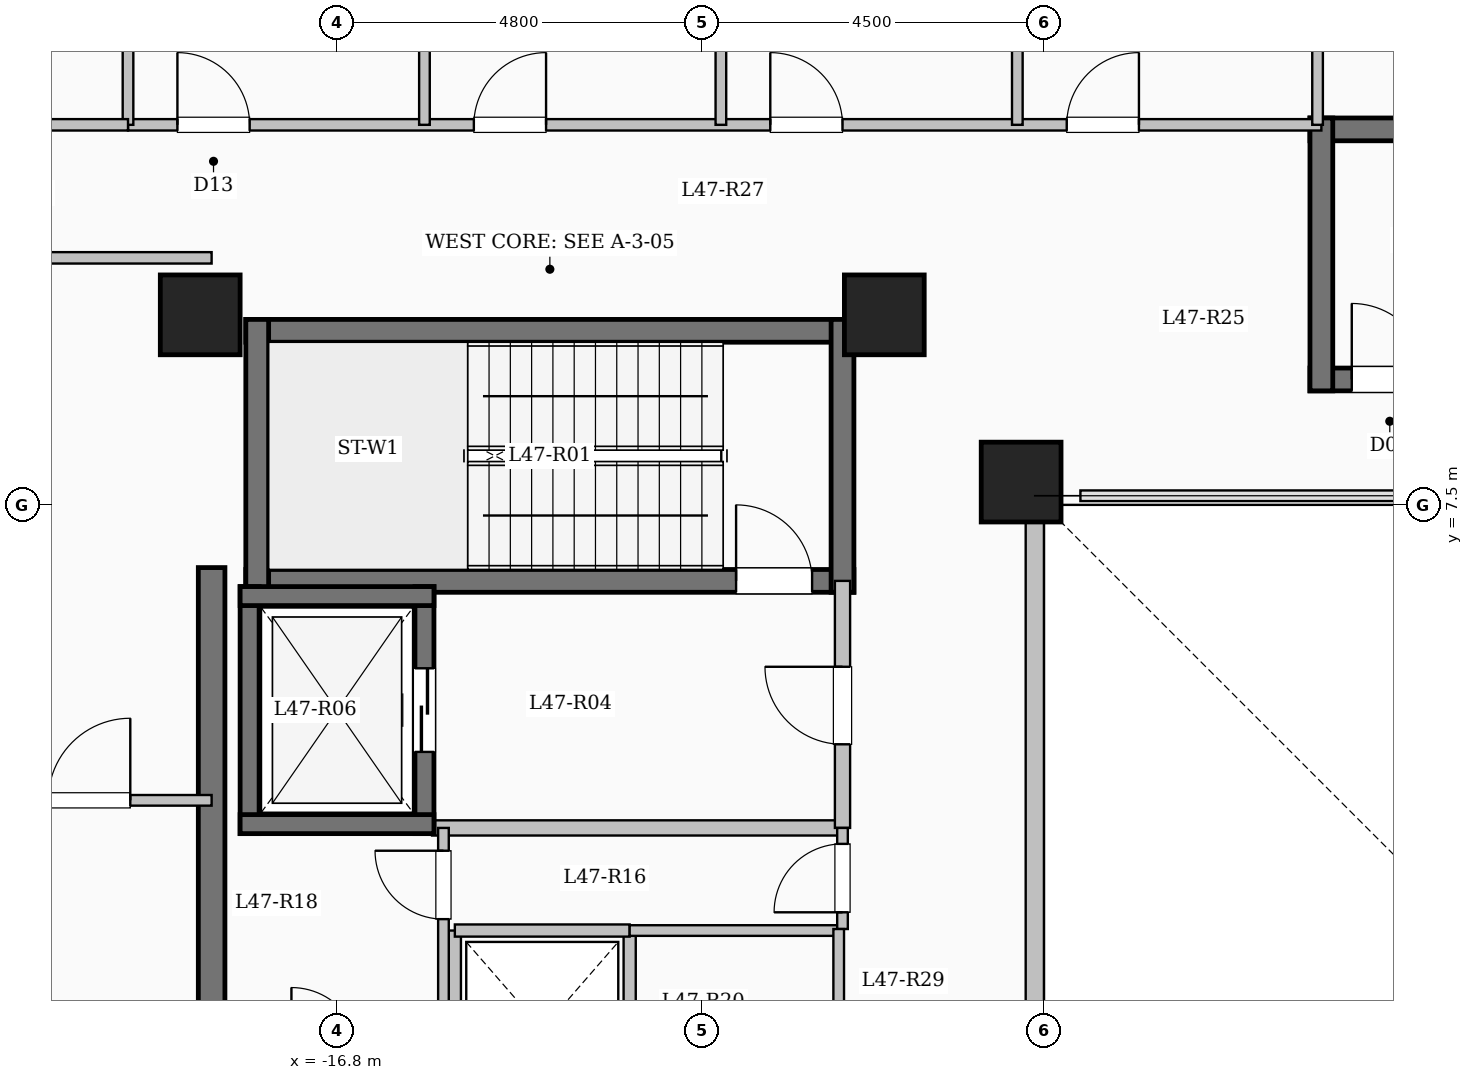
"""IFC4 building model, lengths in metres.
Left out: names, types, materials, properties, quantities, classifications, styles, units other than length and angle.
Written with IfcOpenShell. Run it as: python <this file> out.ifc"""

import sys

from ifc_helpers import new_model, si_unit, direction, frame, frame_2d, origin, origin_2d, place, context, subcontext, project, spatial, rectangle, extrude, element, fill, save


model = new_model("IFC4")
c1 = context("Model", 3, precision=1e-05, world=origin(), true_north=direction((0.0, 1.0)))
c2 = subcontext(c1, "Body", "Model", "MODEL_VIEW")
j1 = project(units=[si_unit("LENGTHUNIT", "METRE"), si_unit("PLANEANGLEUNIT", "RADIAN")], contexts=[c1])
p1 = place(None, origin())
s1 = spatial("IfcSite", under=j1, at=p1, CompositionType="ELEMENT")
p2 = place(p1, origin())
s2 = spatial("IfcBuilding", under=s1, at=p2, CompositionType="ELEMENT")
p3 = place(p2, frame((0.0, 0.0, 172.8)))
s3 = spatial("IfcBuildingStorey", under=s2, at=p3, CompositionType="ELEMENT", Elevation=172.8)
for number, where, z_axis, x_axis in (
    (1, (-7.8, 7.8, 0.0), (0.0, 0.0, 1.0), (1.0, 0.0, 0.0)),
    (2, (-9.6, 10.0, 0.0), (0.0, 0.0, 1.0), (1.0, 0.0, 0.0)),
    (3, (-18.6, 10.0, 0.0), (0.0, 0.0, 1.0), (1.0, 0.0, 0.0)),
):
    element("IfcColumn", number, at=place(p3, frame(where, z_axis=z_axis, x_axis=x_axis)), inside=s3, PredefinedType="COLUMN", context=c2, shape_type="SweptSolid", body=[
        extrude(rectangle(XDim=1.05, YDim=1.05, at=origin_2d()), origin(), (0.0, 0.0, 1.0), 4.5),
    ])
p4 = place(p3, frame((-7.62, 7.62, 0.0), z_axis=(0.0, 0.0, 1.0), x_axis=(0.0, -1.0, 0.0)))
e4 = element("IfcWall", 4, at=p4, inside=s3, PredefinedType="SOLIDWALL", context=c2, shape_type="SweptSolid", body=[
    extrude(rectangle(XDim=15.24, YDim=0.24, at=frame_2d((7.62, 0.0))), origin(), (0.0, 0.0, 1.0), 4.2),
])
p5 = place(p4, frame((6.92, 0.0, 0.95)))
e5 = element("IfcOpeningElement", 5, at=p5, cuts=e4, PredefinedType="OPENING", context=c2, shape_type="SweptSolid", body=[
    extrude(rectangle(XDim=1.4, YDim=1.5, at=frame_2d((0.7, 0.75))), frame((0.0, 0.13, 0.0), z_axis=(0.0, -1.0, 0.0), x_axis=(1.0, 0.0, 0.0)), (0.0, 0.0, 1.0), 0.26),
])
p6 = place(p3, frame((-18.0, 9.79, 0.0), z_axis=(0.0, 0.0, 1.0), x_axis=(1.0, 0.0, 0.0)))
e6 = element("IfcWall", 6, at=p6, inside=s3, PredefinedType="SHEAR", context=c2, shape_type="SweptSolid", body=[
    extrude(rectangle(XDim=8.0, YDim=0.3, at=frame_2d((4.0, 0.0))), origin(), (0.0, 0.0, 1.0), 4.5),
])
p7 = place(p3, frame((-18.0, 6.5, 0.0), z_axis=(0.0, 0.0, 1.0), x_axis=(1.0, 0.0, 0.0)))
e7 = element("IfcWall", 7, at=p7, inside=s3, PredefinedType="SHEAR", context=c2, shape_type="SweptSolid", body=[
    extrude(rectangle(XDim=8.0, YDim=0.3, at=frame_2d((4.0, 0.0))), origin(), (0.0, 0.0, 1.0), 4.5),
])
p8 = place(p7, frame((6.45, 0.0, 0.0)))
e8 = element("IfcOpeningElement", 8, at=p8, cuts=e7, PredefinedType="OPENING", context=c2, shape_type="SweptSolid", body=[
    extrude(rectangle(XDim=1.0, YDim=2.15, at=frame_2d((0.5, 1.075))), frame((0.0, 0.16, 0.0), z_axis=(0.0, -1.0, 0.0), x_axis=(1.0, 0.0, 0.0)), (0.0, 0.0, 1.0), 0.32),
])
for number, where, z_axis, x_axis in (
    (9, (-17.85, 6.35, 0.0), (0.0, 0.0, 1.0), (0.0, 1.0, 0.0)),
    (10, (-10.15, 6.35, 0.0), (0.0, 0.0, 1.0), (0.0, 1.0, 0.0)),
):
    element("IfcWall", number, at=place(p3, frame(where, z_axis=z_axis, x_axis=x_axis)), inside=s3, PredefinedType="SHEAR", context=c2, shape_type="SweptSolid", body=[
        extrude(rectangle(XDim=3.59, YDim=0.3, at=frame_2d((1.795, 0.0))), origin(), (0.0, 0.0, 1.0), 4.5),
    ])
p9 = place(p3, frame((-4.0, 12.44, 0.0), z_axis=(0.0, 0.0, 1.0), x_axis=(1.0, 0.0, 0.0)))
e11 = element("IfcWall", 11, at=p9, inside=s3, PredefinedType="SHEAR", context=c2, shape_type="SweptSolid", body=[
    extrude(rectangle(XDim=8.0, YDim=0.3, at=frame_2d((4.0, 0.0))), origin(), (0.0, 0.0, 1.0), 4.5),
])
p10 = place(p3, frame((-4.0, 9.15, 0.0), z_axis=(0.0, 0.0, 1.0), x_axis=(1.0, 0.0, 0.0)))
e12 = element("IfcWall", 12, at=p10, inside=s3, PredefinedType="SHEAR", context=c2, shape_type="SweptSolid", body=[
    extrude(rectangle(XDim=8.0, YDim=0.3, at=frame_2d((4.0, 0.0))), origin(), (0.0, 0.0, 1.0), 4.5),
])
p11 = place(p10, frame((0.55, 0.0, 0.0)))
e13 = element("IfcOpeningElement", 13, at=p11, cuts=e12, PredefinedType="OPENING", context=c2, shape_type="SweptSolid", body=[
    extrude(rectangle(XDim=1.0, YDim=2.15, at=frame_2d((0.5, 1.075))), frame((0.0, 0.16, 0.0), z_axis=(0.0, -1.0, 0.0), x_axis=(1.0, 0.0, 0.0)), (0.0, 0.0, 1.0), 0.32),
])
p12 = place(p3, frame((-3.85, 9.0, 0.0), z_axis=(0.0, 0.0, 1.0), x_axis=(0.0, 1.0, 0.0)))
e14 = element("IfcWall", 14, at=p12, inside=s3, PredefinedType="SHEAR", context=c2, shape_type="SweptSolid", body=[
    extrude(rectangle(XDim=3.59, YDim=0.3, at=frame_2d((1.795, 0.0))), origin(), (0.0, 0.0, 1.0), 4.5),
])
p13 = place(p3, frame((-15.55, 3.25, 0.0), z_axis=(0.0, 0.0, 1.0), x_axis=(1.0, 0.0, 0.0)))
e15 = element("IfcWall", 15, at=p13, inside=s3, PredefinedType="SOLIDWALL", context=c2, shape_type="SweptSolid", body=[
    extrude(rectangle(XDim=5.4, YDim=0.2, at=frame_2d((2.7, 0.0))), origin(), (0.0, 0.0, 1.0), 4.2),
])
p14 = place(p3, frame((-10.15, 3.25, 0.0), z_axis=(0.0, 0.0, 1.0), x_axis=(0.0, 1.0, 0.0)))
e16 = element("IfcWall", 16, at=p14, inside=s3, PredefinedType="SOLIDWALL", context=c2, shape_type="SweptSolid", body=[
    extrude(rectangle(XDim=3.25, YDim=0.2, at=frame_2d((1.625, 0.0))), origin(), (0.0, 0.0, 1.0), 4.2),
])
p15 = place(p14, frame((1.1, 0.0, 0.0)))
e17 = element("IfcOpeningElement", 17, at=p15, cuts=e16, PredefinedType="OPENING", context=c2, shape_type="SweptSolid", body=[
    extrude(rectangle(XDim=1.02, YDim=2.15, at=frame_2d((0.51, 1.075))), frame((0.0, 0.11, 0.0), z_axis=(0.0, -1.0, 0.0), x_axis=(1.0, 0.0, 0.0)), (0.0, 0.0, 1.0), 0.22),
])
p16 = place(p3, frame((-17.95, 3.175, 0.0), z_axis=(0.0, 0.0, 1.0), x_axis=(0.0, 1.0, 0.0)))
e18 = element("IfcWall", 18, at=p16, inside=s3, PredefinedType="SHEAR", context=c2, shape_type="SweptSolid", body=[
    extrude(rectangle(XDim=3.25, YDim=0.25, at=frame_2d((1.625, 0.0))), origin(), (0.0, 0.0, 1.0), 4.5),
])
p17 = place(p3, frame((-15.65, 3.175, 0.0), z_axis=(0.0, 0.0, 1.0), x_axis=(0.0, 1.0, 0.0)))
e19 = element("IfcWall", 19, at=p17, inside=s3, PredefinedType="SHEAR", context=c2, shape_type="SweptSolid", body=[
    extrude(rectangle(XDim=3.25, YDim=0.25, at=frame_2d((1.625, 0.0))), origin(), (0.0, 0.0, 1.0), 4.5),
])
p18 = place(p17, frame((1.075, 0.0, 0.0)))
e20 = element("IfcOpeningElement", 20, at=p18, cuts=e19, PredefinedType="OPENING", context=c2, shape_type="SweptSolid", body=[
    extrude(rectangle(XDim=1.1, YDim=2.15, at=frame_2d((0.55, 1.075))), frame((0.0, 0.135, 0.0), z_axis=(0.0, -1.0, 0.0), x_axis=(1.0, 0.0, 0.0)), (0.0, 0.0, 1.0), 0.27),
])
for number, where, z_axis, x_axis in (
    (21, (-18.075, 3.3, 0.0), (0.0, 0.0, 1.0), (1.0, 0.0, 0.0)),
    (22, (-18.075, 6.3, 0.0), (0.0, 0.0, 1.0), (1.0, 0.0, 0.0)),
):
    element("IfcWall", number, at=place(p3, frame(where, z_axis=z_axis, x_axis=x_axis)), inside=s3, PredefinedType="SHEAR", context=c2, shape_type="SweptSolid", body=[
        extrude(rectangle(XDim=2.55, YDim=0.25, at=frame_2d((1.275, 0.0))), origin(), (0.0, 0.0, 1.0), 4.5),
    ])
for number, where, z_axis, x_axis in (
    (23, (-15.25, -0.7, 0.0), (0.0, 0.0, 1.0), (0.0, 1.0, 0.0)),
    (24, (-12.95, -0.7, 0.0), (0.0, 0.0, 1.0), (0.0, 1.0, 0.0)),
):
    element("IfcWall", number, at=place(p3, frame(where, z_axis=z_axis, x_axis=x_axis)), inside=s3, PredefinedType="SOLIDWALL", context=c2, shape_type="SweptSolid", body=[
        extrude(rectangle(XDim=2.6, YDim=0.16, at=frame_2d((1.3, 0.0))), origin(), (0.0, 0.0, 1.0), 4.2),
    ])
p19 = place(p3, frame((-15.25, 1.9, 0.0), z_axis=(0.0, 0.0, 1.0), x_axis=(1.0, 0.0, 0.0)))
e25 = element("IfcWall", 25, at=p19, inside=s3, PredefinedType="SOLIDWALL", context=c2, shape_type="SweptSolid", body=[
    extrude(rectangle(XDim=2.3, YDim=0.16, at=frame_2d((1.15, 0.0))), origin(), (0.0, 0.0, 1.0), 4.2),
])
p20 = place(p3, frame((-18.45, -7.375, 0.0), z_axis=(0.0, 0.0, 1.0), x_axis=(0.0, 1.0, 0.0)))
e26 = element("IfcWall", 26, at=p20, inside=s3, PredefinedType="SHEAR", context=c2, shape_type="SweptSolid", body=[
    extrude(rectangle(XDim=14.05, YDim=0.35, at=frame_2d((7.025, 0.0))), origin(), (0.0, 0.0, 1.0), 4.5),
])
p21 = place(p3, frame((-12.95, 1.9, 0.0), z_axis=(0.0, 0.0, 1.0), x_axis=(1.0, 0.0, 0.0)))
e27 = element("IfcWall", 27, at=p21, inside=s3, PredefinedType="PARTITIONING", context=c2, shape_type="SweptSolid", body=[
    extrude(rectangle(XDim=2.8, YDim=0.14, at=frame_2d((1.4, 0.0))), origin(), (0.0, 0.0, 1.0), 4.2),
])
p22 = place(p3, frame((-10.15, 1.92, 0.0), z_axis=(0.0, 0.0, 1.0), x_axis=(0.0, 1.0, 0.0)))
e28 = element("IfcWall", 28, at=p22, inside=s3, PredefinedType="PARTITIONING", context=c2, shape_type="SweptSolid", body=[
    extrude(rectangle(XDim=1.33, YDim=0.14, at=frame_2d((0.665, 0.0))), origin(), (0.0, 0.0, 1.0), 4.2),
])
p23 = place(p22, frame((0.22, 0.0, 0.0)))
e29 = element("IfcOpeningElement", 29, at=p23, cuts=e28, PredefinedType="OPENING", context=c2, shape_type="SweptSolid", body=[
    extrude(rectangle(XDim=0.9, YDim=2.08, at=frame_2d((0.45, 1.04))), frame((0.0, 0.08, 0.0), z_axis=(0.0, -1.0, 0.0), x_axis=(1.0, 0.0, 0.0)), (0.0, 0.0, 1.0), 0.16),
])
p24 = place(p3, frame((-15.4, -7.2, 0.0), z_axis=(0.0, 0.0, 1.0), x_axis=(0.0, 1.0, 0.0)))
e30 = element("IfcWall", 30, at=p24, inside=s3, PredefinedType="PARTITIONING", context=c2, shape_type="SweptSolid", body=[
    extrude(rectangle(XDim=10.45, YDim=0.14, at=frame_2d((5.225, 0.0))), origin(), (0.0, 0.0, 1.0), 4.2),
])
p25 = place(p24, frame((9.25, 0.0, 0.0)))
e31 = element("IfcOpeningElement", 31, at=p25, cuts=e30, PredefinedType="OPENING", context=c2, shape_type="SweptSolid", body=[
    extrude(rectangle(XDim=0.9, YDim=2.08, at=frame_2d((0.45, 1.04))), frame((0.0, 0.08, 0.0), z_axis=(0.0, -1.0, 0.0), x_axis=(1.0, 0.0, 0.0)), (0.0, 0.0, 1.0), 0.16),
])
p26 = place(p3, frame((-10.2, -7.2, 0.0), z_axis=(0.0, 0.0, 1.0), x_axis=(0.0, 1.0, 0.0)))
e32 = element("IfcWall", 32, at=p26, inside=s3, PredefinedType="PARTITIONING", context=c2, shape_type="SweptSolid", body=[
    extrude(rectangle(XDim=9.12, YDim=0.14, at=frame_2d((4.56, 0.0))), origin(), (0.0, 0.0, 1.0), 4.2),
])
p27 = place(p26, frame((1.9, 0.0, 0.0)))
e33 = element("IfcOpeningElement", 33, at=p27, cuts=e32, PredefinedType="OPENING", context=c2, shape_type="SweptSolid", body=[
    extrude(rectangle(XDim=0.95, YDim=2.12, at=frame_2d((0.475, 1.06))), frame((0.0, 0.08, 0.0), z_axis=(0.0, -1.0, 0.0), x_axis=(1.0, 0.0, 0.0)), (0.0, 0.0, 1.0), 0.16),
])
p28 = place(p26, frame((6.6, 0.0, 0.0)))
e34 = element("IfcOpeningElement", 34, at=p28, cuts=e32, PredefinedType="OPENING", context=c2, shape_type="SweptSolid", body=[
    extrude(rectangle(XDim=0.95, YDim=2.12, at=frame_2d((0.475, 1.06))), frame((0.0, 0.08, 0.0), z_axis=(0.0, -1.0, 0.0), x_axis=(1.0, 0.0, 0.0)), (0.0, 0.0, 1.0), 0.16),
])
p29 = place(p3, frame((-19.55, 12.5, 0.0), z_axis=(0.0, 0.0, 1.0), x_axis=(1.0, 0.0, 0.0)))
e35 = element("IfcWall", 35, at=p29, inside=s3, PredefinedType="PARTITIONING", context=c2, shape_type="SweptSolid", body=[
    extrude(rectangle(XDim=15.7, YDim=0.15, at=frame_2d((7.85, 0.0))), origin(), (0.0, 0.0, 1.0), 4.2),
])
p30 = place(p29, frame((0.65, 0.0, 0.0)))
e36 = element("IfcOpeningElement", 36, at=p30, cuts=e35, PredefinedType="OPENING", context=c2, shape_type="SweptSolid", body=[
    extrude(rectangle(XDim=0.95, YDim=2.15, at=frame_2d((0.475, 1.075))), frame((0.0, 0.085, 0.0), z_axis=(0.0, -1.0, 0.0), x_axis=(1.0, 0.0, 0.0)), (0.0, 0.0, 1.0), 0.17),
])
p31 = place(p29, frame((4.55, 0.0, 0.0)))
e37 = element("IfcOpeningElement", 37, at=p31, cuts=e35, PredefinedType="OPENING", context=c2, shape_type="SweptSolid", body=[
    extrude(rectangle(XDim=0.95, YDim=2.15, at=frame_2d((0.475, 1.075))), frame((0.0, 0.085, 0.0), z_axis=(0.0, -1.0, 0.0), x_axis=(1.0, 0.0, 0.0)), (0.0, 0.0, 1.0), 0.17),
])
p32 = place(p29, frame((8.45, 0.0, 0.0)))
e38 = element("IfcOpeningElement", 38, at=p32, cuts=e35, PredefinedType="OPENING", context=c2, shape_type="SweptSolid", body=[
    extrude(rectangle(XDim=0.95, YDim=2.15, at=frame_2d((0.475, 1.075))), frame((0.0, 0.085, 0.0), z_axis=(0.0, -1.0, 0.0), x_axis=(1.0, 0.0, 0.0)), (0.0, 0.0, 1.0), 0.17),
])
p33 = place(p29, frame((12.35, 0.0, 0.0)))
e39 = element("IfcOpeningElement", 39, at=p33, cuts=e35, PredefinedType="OPENING", context=c2, shape_type="SweptSolid", body=[
    extrude(rectangle(XDim=0.95, YDim=2.15, at=frame_2d((0.475, 1.075))), frame((0.0, 0.085, 0.0), z_axis=(0.0, -1.0, 0.0), x_axis=(1.0, 0.0, 0.0)), (0.0, 0.0, 1.0), 0.17),
])
p34 = place(p3, frame((-3.9, 12.5, 0.0), z_axis=(0.0, 0.0, 1.0), x_axis=(0.0, 1.0, 0.0)))
e40 = element("IfcWall", 40, at=p34, inside=s3, PredefinedType="PARTITIONING", context=c2, shape_type="SweptSolid", body=[
    extrude(rectangle(XDim=10.18, YDim=0.14, at=frame_2d((5.09, 0.0))), origin(), (0.0, 0.0, 1.0), 4.2),
])
for number, where, z_axis, x_axis in (
    (41, (-15.65, 12.5, 0.0), (0.0, 0.0, 1.0), (0.0, 1.0, 0.0)),
    (42, (-11.75, 12.5, 0.0), (0.0, 0.0, 1.0), (0.0, 1.0, 0.0)),
):
    element("IfcWall", number, at=place(p3, frame(where, z_axis=z_axis, x_axis=x_axis)), inside=s3, PredefinedType="PARTITIONING", context=c2, shape_type="SweptSolid", body=[
        extrude(rectangle(XDim=8.7, YDim=0.14, at=frame_2d((4.35, 0.0))), origin(), (0.0, 0.0, 1.0), 4.2),
    ])
p35 = place(p3, frame((-7.85, 12.5, 0.0), z_axis=(0.0, 0.0, 1.0), x_axis=(0.0, 1.0, 0.0)))
e43 = element("IfcWall", 43, at=p35, inside=s3, PredefinedType="PARTITIONING", context=c2, shape_type="SweptSolid", body=[
    extrude(rectangle(XDim=9.477, YDim=0.14, at=frame_2d((4.739, 0.0))), origin(), (0.0, 0.0, 1.0), 3.685),
])
p36 = place(p3, frame((-25.08, 10.75, 0.0), z_axis=(0.0, 0.0, 1.0), x_axis=(1.0, 0.0, 0.0)))
e44 = element("IfcWall", 44, at=p36, inside=s3, PredefinedType="PARTITIONING", context=c2, shape_type="SweptSolid", body=[
    extrude(rectangle(XDim=6.63, YDim=0.15, at=frame_2d((3.315, 0.0))), origin(), (0.0, 0.0, 1.0), 4.2),
])
p37 = place(p3, frame((-19.55, 12.5, 0.0), z_axis=(0.0, 0.0, 1.0), x_axis=(0.0, 1.0, 0.0)))
e45 = element("IfcWall", 45, at=p37, inside=s3, PredefinedType="PARTITIONING", context=c2, shape_type="SweptSolid", body=[
    extrude(rectangle(XDim=4.75, YDim=0.14, at=frame_2d((2.375, 0.0))), origin(), (0.0, 0.0, 1.0), 4.2),
])
p38 = place(p3, frame((-25.08, 12.5, 0.0), z_axis=(0.0, 0.0, 1.0), x_axis=(1.0, 0.0, 0.0)))
e46 = element("IfcWall", 46, at=p38, inside=s3, PredefinedType="PARTITIONING", context=c2, shape_type="SweptSolid", body=[
    extrude(rectangle(XDim=5.53, YDim=0.15, at=frame_2d((2.765, 0.0))), origin(), (0.0, 0.0, 1.0), 4.2),
])
p39 = place(p38, frame((2.29, 0.0, 0.0)))
e47 = element("IfcOpeningElement", 47, at=p39, cuts=e46, PredefinedType="OPENING", context=c2, shape_type="SweptSolid", body=[
    extrude(rectangle(XDim=0.95, YDim=2.15, at=frame_2d((0.475, 1.075))), frame((0.0, 0.085, 0.0), z_axis=(0.0, -1.0, 0.0), x_axis=(1.0, 0.0, 0.0)), (0.0, 0.0, 1.0), 0.17),
])
p40 = place(p3, frame((-25.08, 3.613, 0.0), z_axis=(0.0, 0.0, 1.0), x_axis=(1.0, 0.0, 0.0)))
e48 = element("IfcWall", 48, at=p40, inside=s3, PredefinedType="PARTITIONING", context=c2, shape_type="SweptSolid", body=[
    extrude(rectangle(XDim=6.63, YDim=0.14, at=frame_2d((3.315, 0.0))), origin(), (0.0, 0.0, 1.0), 4.2),
])
p41 = place(p40, frame((4.48, 0.0, 0.0)))
e49 = element("IfcOpeningElement", 49, at=p41, cuts=e48, PredefinedType="OPENING", context=c2, shape_type="SweptSolid", body=[
    extrude(rectangle(XDim=1.08, YDim=2.15, at=frame_2d((0.54, 1.075))), frame((0.0, 0.08, 0.0), z_axis=(0.0, -1.0, 0.0), x_axis=(1.0, 0.0, 0.0)), (0.0, 0.0, 1.0), 0.16),
])
p42 = place(p8, origin())
e50 = element("IfcDoor", 50, at=p42, inside=s3, OperationType="SINGLE_SWING_LEFT", PredefinedType="DOOR", context=c2, shape_type="SweptSolid", body=[
    extrude(rectangle(XDim=1.0, YDim=2.15, at=frame_2d((0.5, 1.075))), frame((0.0, 0.025, 0.0), z_axis=(0.0, -1.0, 0.0), x_axis=(1.0, 0.0, 0.0)), (0.0, 0.0, 1.0), 0.05),
])
fill(e8, e50)
p43 = place(p11, origin())
e51 = element("IfcDoor", 51, at=p43, inside=s3, OperationType="SINGLE_SWING_LEFT", PredefinedType="DOOR", context=c2, shape_type="SweptSolid", body=[
    extrude(rectangle(XDim=1.0, YDim=2.15, at=frame_2d((0.5, 1.075))), frame((0.0, 0.025, 0.0), z_axis=(0.0, -1.0, 0.0), x_axis=(1.0, 0.0, 0.0)), (0.0, 0.0, 1.0), 0.05),
])
fill(e13, e51)
p44 = place(p15, origin())
e52 = element("IfcDoor", 52, at=p44, inside=s3, OperationType="SINGLE_SWING_RIGHT", PredefinedType="DOOR", context=c2, shape_type="SweptSolid", body=[
    extrude(rectangle(XDim=1.02, YDim=2.15, at=frame_2d((0.51, 1.075))), frame((0.0, 0.025, 0.0), z_axis=(0.0, -1.0, 0.0), x_axis=(1.0, 0.0, 0.0)), (0.0, 0.0, 1.0), 0.05),
])
fill(e17, e52)
p45 = place(p18, origin())
e53 = element("IfcDoor", 53, at=p45, inside=s3, OperationType="SLIDING_TO_LEFT", PredefinedType="DOOR", context=c2, shape_type="SweptSolid", body=[
    extrude(rectangle(XDim=1.1, YDim=2.15, at=frame_2d((0.55, 1.075))), frame((0.0, 0.025, 0.0), z_axis=(0.0, -1.0, 0.0), x_axis=(1.0, 0.0, 0.0)), (0.0, 0.0, 1.0), 0.05),
])
fill(e20, e53)
p46 = place(p23, origin())
e54 = element("IfcDoor", 54, at=p46, inside=s3, OperationType="SINGLE_SWING_LEFT", PredefinedType="DOOR", context=c2, shape_type="SweptSolid", body=[
    extrude(rectangle(XDim=0.9, YDim=2.08, at=frame_2d((0.45, 1.04))), frame((0.0, 0.025, 0.0), z_axis=(0.0, -1.0, 0.0), x_axis=(1.0, 0.0, 0.0)), (0.0, 0.0, 1.0), 0.05),
])
fill(e29, e54)
p47 = place(p25, origin())
e55 = element("IfcDoor", 55, at=p47, inside=s3, OperationType="SINGLE_SWING_RIGHT", PredefinedType="DOOR", context=c2, shape_type="SweptSolid", body=[
    extrude(rectangle(XDim=0.9, YDim=2.08, at=frame_2d((0.45, 1.04))), frame((0.0, 0.025, 0.0), z_axis=(0.0, -1.0, 0.0), x_axis=(1.0, 0.0, 0.0)), (0.0, 0.0, 1.0), 0.05),
])
fill(e31, e55)
p48 = place(p30, origin())
e56 = element("IfcDoor", 56, at=p48, inside=s3, OperationType="SINGLE_SWING_LEFT", PredefinedType="DOOR", context=c2, shape_type="SweptSolid", body=[
    extrude(rectangle(XDim=0.95, YDim=2.15, at=frame_2d((0.475, 1.075))), frame((0.0, 0.025, 0.0), z_axis=(0.0, -1.0, 0.0), x_axis=(1.0, 0.0, 0.0)), (0.0, 0.0, 1.0), 0.05),
])
fill(e36, e56)
p49 = place(p31, origin())
e57 = element("IfcDoor", 57, at=p49, inside=s3, OperationType="SINGLE_SWING_RIGHT", PredefinedType="DOOR", context=c2, shape_type="SweptSolid", body=[
    extrude(rectangle(XDim=0.95, YDim=2.15, at=frame_2d((0.475, 1.075))), frame((0.0, 0.025, 0.0), z_axis=(0.0, -1.0, 0.0), x_axis=(1.0, 0.0, 0.0)), (0.0, 0.0, 1.0), 0.05),
])
fill(e37, e57)
p50 = place(p32, origin())
e58 = element("IfcDoor", 58, at=p50, inside=s3, OperationType="SINGLE_SWING_LEFT", PredefinedType="DOOR", context=c2, shape_type="SweptSolid", body=[
    extrude(rectangle(XDim=0.95, YDim=2.15, at=frame_2d((0.475, 1.075))), frame((0.0, 0.025, 0.0), z_axis=(0.0, -1.0, 0.0), x_axis=(1.0, 0.0, 0.0)), (0.0, 0.0, 1.0), 0.05),
])
fill(e38, e58)
p51 = place(p33, origin())
e59 = element("IfcDoor", 59, at=p51, inside=s3, OperationType="SINGLE_SWING_RIGHT", PredefinedType="DOOR", context=c2, shape_type="SweptSolid", body=[
    extrude(rectangle(XDim=0.95, YDim=2.15, at=frame_2d((0.475, 1.075))), frame((0.0, 0.025, 0.0), z_axis=(0.0, -1.0, 0.0), x_axis=(1.0, 0.0, 0.0)), (0.0, 0.0, 1.0), 0.05),
])
fill(e39, e59)
p52 = place(p41, origin())
e60 = element("IfcDoor", 60, at=p52, inside=s3, OperationType="SINGLE_SWING_RIGHT", PredefinedType="DOOR", context=c2, shape_type="SweptSolid", body=[
    extrude(rectangle(XDim=1.08, YDim=2.15, at=frame_2d((0.54, 1.075))), frame((0.0, 0.025, 0.0), z_axis=(0.0, -1.0, 0.0), x_axis=(1.0, 0.0, 0.0)), (0.0, 0.0, 1.0), 0.05),
])
fill(e49, e60)
save(model, sys.argv[1])
